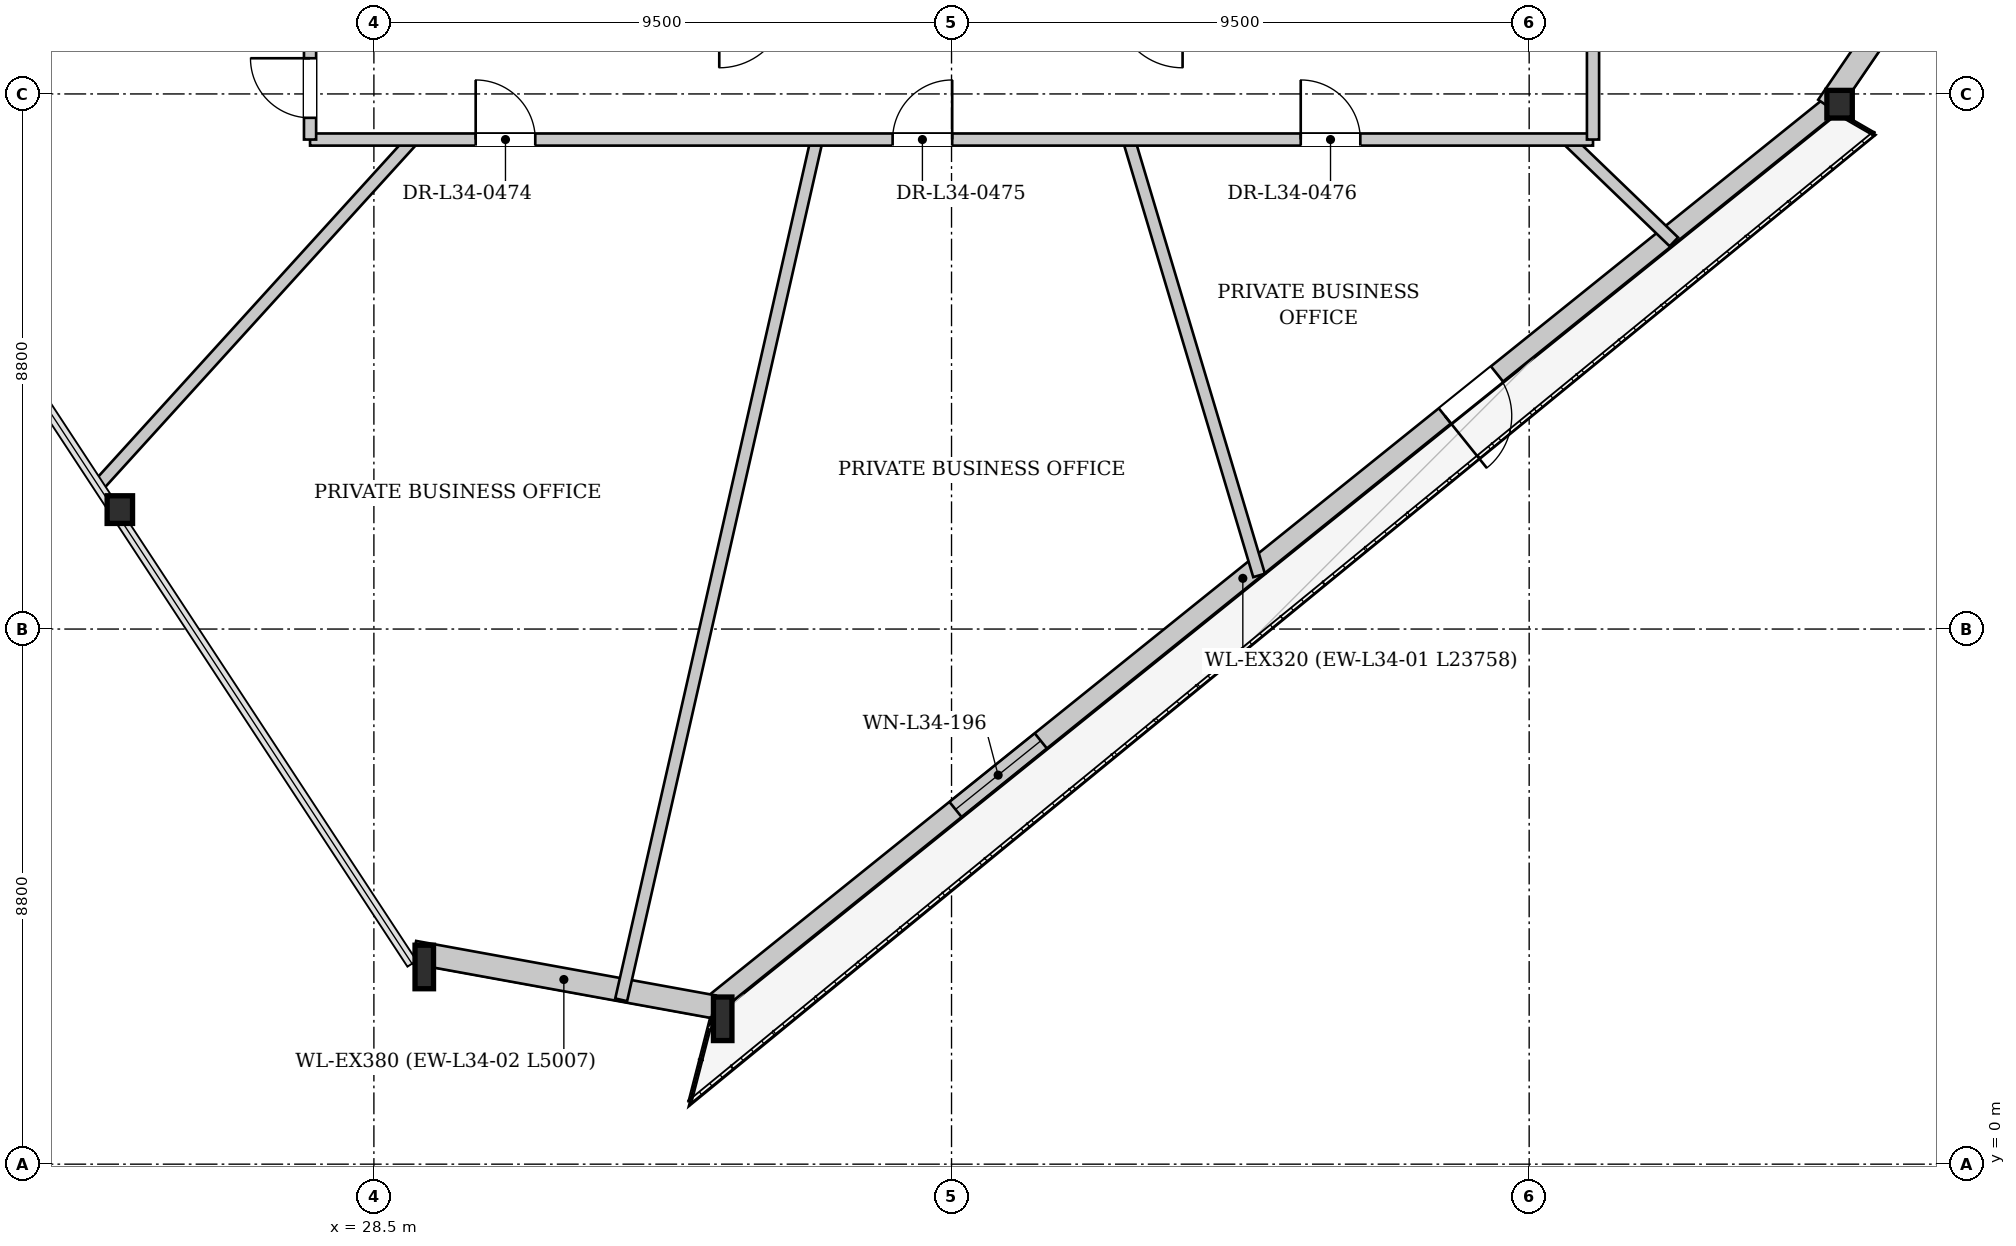
"""IFC4 building model, lengths in metres.
Left out: names, types, materials, properties, quantities, classifications, styles, units other than length and angle.
Written with IfcOpenShell. Run it as: python <this file> out.ifc"""

import sys

from ifc_helpers import new_model, si_unit, direction, frame, frame_2d, origin, origin_2d, place, context, subcontext, project, spatial, rectangle, i_section, extrude, source, transform, mapped, element, fill, save


model = new_model("IFC4")
c1 = context("Model", 3, precision=1e-05, world=origin(), true_north=direction((0.0, 1.0)))
c2 = subcontext(c1, "Body", "Model", "MODEL_VIEW")
j1 = project(units=[si_unit("LENGTHUNIT", "METRE"), si_unit("PLANEANGLEUNIT", "RADIAN")], contexts=[c1])
p1 = place(None, origin())
s1 = spatial("IfcSite", under=j1, at=p1, CompositionType="ELEMENT")
p2 = place(p1, origin())
s2 = spatial("IfcBuilding", under=s1, at=p2, CompositionType="ELEMENT")
p3 = place(p2, frame((0.0, 0.0, 130.55)))
s3 = spatial("IfcBuildingStorey", under=s2, at=p3, CompositionType="ELEMENT", Elevation=130.55)
m1 = source(origin(), c2, "Body", "SweptSolid", [
    extrude(i_section(OverallWidth=0.418, OverallDepth=0.455, WebThickness=0.038, FlangeThickness=0.059, at=origin_2d()), origin(), (0.0, 0.0, 1.0), 3.404),
])
p4 = place(p3, frame((24.167, 10.855, 0.0), z_axis=(0.091084690741, -0.05357501101, 0.994400974109), x_axis=(0.50699046576, 0.861951662002, 0.0)))
e1 = element("IfcColumn", 1, at=p4, inside=s3, PredefinedType="COLUMN", context=c2, shape_type="MappedRepresentation", body=[
    mapped(m1, transform((0.0, 0.0, 0.0), x_axis=(1.0, 0.0, 0.0), y_axis=(0.0, 1.0, 0.0), z_axis=(0.0, 0.0, 1.0), scale=1.0)),
])
m2 = source(origin(), c2, "Body", "SweptSolid", [
    extrude(i_section(OverallWidth=0.304, OverallDepth=0.716, WebThickness=0.021, FlangeThickness=0.04, at=origin_2d()), origin(), (0.0, 0.0, 1.0), 3.411),
])
p5 = place(p3, frame((29.127, 3.297, 0.0), z_axis=(0.118181469683, -0.031853878867, 0.992480967387), x_axis=(0.260246111471, 0.965542314694, 0.0)))
e2 = element("IfcColumn", 2, at=p5, inside=s3, PredefinedType="COLUMN", context=c2, shape_type="MappedRepresentation", body=[
    mapped(m2, transform((0.0, 0.0, 0.0), x_axis=(1.0, 0.0, 0.0), y_axis=(0.0, 1.0, 0.0), z_axis=(0.0, 0.0, 1.0), scale=1.0)),
])
m3 = source(origin(), c2, "Body", "SweptSolid", [
    extrude(i_section(OverallWidth=0.304, OverallDepth=0.716, WebThickness=0.021, FlangeThickness=0.04, at=origin_2d()), origin(), (0.0, 0.0, 1.0), 3.405),
])
p6 = place(p3, frame((34.053, 2.402, 0.0), z_axis=(0.107485148183, -0.006740229439, 0.994183842268), x_axis=(0.062585538851, 0.998039603586, 0.0)))
e3 = element("IfcColumn", 3, at=p6, inside=s3, PredefinedType="COLUMN", context=c2, shape_type="MappedRepresentation", body=[
    mapped(m3, transform((0.0, 0.0, 0.0), x_axis=(1.0, 0.0, 0.0), y_axis=(0.0, 1.0, 0.0), z_axis=(0.0, 0.0, 1.0), scale=1.0)),
])
m4 = source(origin(), c2, "Body", "SweptSolid", [
    extrude(i_section(OverallWidth=0.418, OverallDepth=0.455, WebThickness=0.038, FlangeThickness=0.059, at=origin_2d()), origin(), (0.0, 0.0, 1.0), 3.397),
])
p7 = place(p3, frame((52.567, 17.291, 0.0), z_axis=(0.0222761497, 0.082781046627, 0.996318759973), x_axis=(-0.965648124295, 0.259853227892, 0.0)))
e4 = element("IfcColumn", 4, at=p7, inside=s3, PredefinedType="COLUMN", context=c2, shape_type="MappedRepresentation", body=[
    mapped(m4, transform((0.0, 0.0, 0.0), x_axis=(1.0, 0.0, 0.0), y_axis=(0.0, 1.0, 0.0), z_axis=(0.0, 0.0, 1.0), scale=1.0)),
])
p8 = place(p3, frame((52.467, 17.415, 0.0), z_axis=(0.0, 0.0, 1.0), x_axis=(-0.779274216226, -0.626683090506, 0.0)))
e5 = element("IfcWall", 5, at=p8, inside=s3, PredefinedType="SOLIDWALL", context=c2, shape_type="SweptSolid", body=[
    extrude(rectangle(XDim=23.758, YDim=0.32, at=frame_2d((11.879, 0.0))), origin(), (0.0, 0.0, 1.0), 2.692),
])
p9 = place(p8, frame((7.053, 0.0, 0.0)))
e6 = element("IfcOpeningElement", 6, at=p9, cuts=e5, PredefinedType="OPENING", context=c2, shape_type="SweptSolid", body=[
    extrude(rectangle(XDim=1.1, YDim=2.3, at=frame_2d((0.55, 1.15))), frame((0.0, 0.17, 0.0), z_axis=(0.0, -1.0, 0.0), x_axis=(1.0, 0.0, 0.0)), (0.0, 0.0, 1.0), 0.34),
])
p10 = place(p8, frame((16.681, 0.0, 0.372)))
e7 = element("IfcOpeningElement", 7, at=p10, cuts=e5, PredefinedType="OPENING", context=c2, shape_type="SweptSolid", body=[
    extrude(rectangle(XDim=1.8, YDim=2.2, at=frame_2d((0.9, 1.1))), frame((0.0, 0.17, 0.0), z_axis=(0.0, -1.0, 0.0), x_axis=(1.0, 0.0, 0.0)), (0.0, 0.0, 1.0), 0.34),
])
p11 = place(p3, frame((34.087, 2.589, 0.0), z_axis=(0.0, 0.0, 1.0), x_axis=(-0.983886288639, 0.178795332793, 0.0)))
e8 = element("IfcWall", 8, at=p11, inside=s3, PredefinedType="SOLIDWALL", context=c2, shape_type="SweptSolid", body=[
    extrude(rectangle(XDim=5.007, YDim=0.38, at=frame_2d((2.503, 0.0))), origin(), (0.0, 0.0, 1.0), 2.692),
])
p12 = place(p3, frame((65.801, 37.023, 0.0), z_axis=(0.0, 0.0, 1.0), x_axis=(-0.563622492104, -0.826032497179, 0.0)))
e9 = element("IfcWall", 9, at=p12, inside=s3, PredefinedType="SOLIDWALL", context=c2, shape_type="SweptSolid", body=[
    extrude(rectangle(XDim=23.758, YDim=0.38, at=frame_2d((11.879, 0.0))), origin(), (0.0, 0.0, 1.0), 2.692),
])
p13 = place(p12, frame((5.552, 0.0, 0.322)))
e10 = element("IfcOpeningElement", 10, at=p13, cuts=e9, PredefinedType="OPENING", context=c2, shape_type="SweptSolid", body=[
    extrude(rectangle(XDim=2.2, YDim=2.25, at=frame_2d((1.1, 1.125))), frame((0.0, 0.2, 0.0), z_axis=(0.0, -1.0, 0.0), x_axis=(1.0, 0.0, 0.0)), (0.0, 0.0, 1.0), 0.4),
])
p14 = place(p12, frame((16.756, 0.0, 0.322)))
e11 = element("IfcOpeningElement", 11, at=p14, cuts=e9, PredefinedType="OPENING", context=c2, shape_type="SweptSolid", body=[
    extrude(rectangle(XDim=2.2, YDim=2.25, at=frame_2d((1.1, 1.125))), frame((0.0, 0.2, 0.0), z_axis=(0.0, -1.0, 0.0), x_axis=(1.0, 0.0, 0.0)), (0.0, 0.0, 1.0), 0.4),
])
p15 = place(p3, frame((29.139, 16.85, 0.0), z_axis=(0.0, 0.0, 1.0), x_axis=(-0.672544271628, -0.74005689153, 0.0)))
e12 = element("IfcWall", 12, at=p15, inside=s3, PredefinedType="PARTITIONING", context=c2, shape_type="SweptSolid", body=[
    extrude(rectangle(XDim=7.659, YDim=0.2, at=frame_2d((3.83, 0.0))), origin(), (0.0, 0.0, 1.0), 3.3),
])
p16 = place(p3, frame((35.783, 16.85, 0.0), z_axis=(0.0, 0.0, 1.0), x_axis=(-0.221701107418, -0.975114669652, 0.0)))
e13 = element("IfcWall", 13, at=p16, inside=s3, PredefinedType="PARTITIONING", context=c2, shape_type="SweptSolid", body=[
    extrude(rectangle(XDim=14.509, YDim=0.2, at=frame_2d((7.254, 0.0))), origin(), (0.0, 0.0, 1.0), 3.3),
])
p17 = place(p3, frame((40.915, 16.85, 0.0), z_axis=(0.0, 0.0, 1.0), x_axis=(0.286440656608, -0.958097985721, 0.0)))
e14 = element("IfcWall", 14, at=p17, inside=s3, PredefinedType="PARTITIONING", context=c2, shape_type="SweptSolid", body=[
    extrude(rectangle(XDim=7.482, YDim=0.2, at=frame_2d((3.741, 0.0))), origin(), (0.0, 0.0, 1.0), 3.3),
])
p18 = place(p3, frame((48.132, 16.85, 0.0), z_axis=(0.0, 0.0, 1.0), x_axis=(0.720560376071, -0.69339220102, 0.0)))
e15 = element("IfcWall", 15, at=p18, inside=s3, PredefinedType="PARTITIONING", context=c2, shape_type="SweptSolid", body=[
    extrude(rectangle(XDim=2.426, YDim=0.2, at=frame_2d((1.213, 0.0))), origin(), (0.0, 0.0, 1.0), 3.3),
])
p19 = place(p3, frame((27.45, 16.85, 0.0), z_axis=(0.0, 0.0, 1.0), x_axis=(1.0, 0.0, 0.0)))
e16 = element("IfcWall", 16, at=p19, inside=s3, PredefinedType="PARTITIONING", context=c2, shape_type="SweptSolid", body=[
    extrude(rectangle(XDim=21.1, YDim=0.2, at=frame_2d((10.55, 0.0))), origin(), (0.0, 0.0, 1.0), 3.3),
])
p20 = place(p19, frame((2.724, 0.0, 0.0)))
e17 = element("IfcOpeningElement", 17, at=p20, cuts=e16, PredefinedType="OPENING", context=c2, shape_type="SweptSolid", body=[
    extrude(rectangle(XDim=0.98, YDim=2.15, at=frame_2d((0.49, 1.075))), frame((0.0, 0.11, 0.0), z_axis=(0.0, -1.0, 0.0), x_axis=(1.0, 0.0, 0.0)), (0.0, 0.0, 1.0), 0.22),
])
p21 = place(p19, frame((9.581, 0.0, 0.0)))
e18 = element("IfcOpeningElement", 18, at=p21, cuts=e16, PredefinedType="OPENING", context=c2, shape_type="SweptSolid", body=[
    extrude(rectangle(XDim=0.98, YDim=2.15, at=frame_2d((0.49, 1.075))), frame((0.0, 0.11, 0.0), z_axis=(0.0, -1.0, 0.0), x_axis=(1.0, 0.0, 0.0)), (0.0, 0.0, 1.0), 0.22),
])
p22 = place(p19, frame((16.293, 0.0, 0.0)))
e19 = element("IfcOpeningElement", 19, at=p22, cuts=e16, PredefinedType="OPENING", context=c2, shape_type="SweptSolid", body=[
    extrude(rectangle(XDim=0.98, YDim=2.15, at=frame_2d((0.49, 1.075))), frame((0.0, 0.11, 0.0), z_axis=(0.0, -1.0, 0.0), x_axis=(1.0, 0.0, 0.0)), (0.0, 0.0, 1.0), 0.22),
])
p23 = place(p3, frame((27.45, 16.85, 0.0), z_axis=(0.0, 0.0, 1.0), x_axis=(0.0, 1.0, 0.0)))
e20 = element("IfcWall", 20, at=p23, inside=s3, PredefinedType="PARTITIONING", context=c2, shape_type="SweptSolid", body=[
    extrude(rectangle(XDim=19.5, YDim=0.2, at=frame_2d((9.75, 0.0))), origin(), (0.0, 0.0, 1.0), 3.3),
])
p24 = place(p23, frame((15.887, 0.0, 0.0)))
e21 = element("IfcOpeningElement", 21, at=p24, cuts=e20, PredefinedType="OPENING", context=c2, shape_type="SweptSolid", body=[
    extrude(rectangle(XDim=0.98, YDim=2.15, at=frame_2d((0.49, 1.075))), frame((0.0, 0.11, 0.0), z_axis=(0.0, -1.0, 0.0), x_axis=(1.0, 0.0, 0.0)), (0.0, 0.0, 1.0), 0.22),
])
p25 = place(p23, frame((8.553, 0.0, 0.0)))
e22 = element("IfcOpeningElement", 22, at=p25, cuts=e20, PredefinedType="OPENING", context=c2, shape_type="SweptSolid", body=[
    extrude(rectangle(XDim=0.98, YDim=2.15, at=frame_2d((0.49, 1.075))), frame((0.0, 0.11, 0.0), z_axis=(0.0, -1.0, 0.0), x_axis=(1.0, 0.0, 0.0)), (0.0, 0.0, 1.0), 0.22),
])
p26 = place(p23, frame((0.357, 0.0, 0.0)))
e23 = element("IfcOpeningElement", 23, at=p26, cuts=e20, PredefinedType="OPENING", context=c2, shape_type="SweptSolid", body=[
    extrude(rectangle(XDim=0.98, YDim=2.15, at=frame_2d((0.49, 1.075))), frame((0.0, 0.11, 0.0), z_axis=(0.0, -1.0, 0.0), x_axis=(1.0, 0.0, 0.0)), (0.0, 0.0, 1.0), 0.22),
])
p27 = place(p3, frame((48.55, 16.85, 0.0), z_axis=(0.0, 0.0, 1.0), x_axis=(0.0, 1.0, 0.0)))
e24 = element("IfcWall", 24, at=p27, inside=s3, PredefinedType="PARTITIONING", context=c2, shape_type="SweptSolid", body=[
    extrude(rectangle(XDim=19.5, YDim=0.2, at=frame_2d((9.75, 0.0))), origin(), (0.0, 0.0, 1.0), 3.3),
])
p28 = place(p27, frame((10.625, 0.0, 0.0)))
e25 = element("IfcOpeningElement", 25, at=p28, cuts=e24, PredefinedType="OPENING", context=c2, shape_type="SweptSolid", body=[
    extrude(rectangle(XDim=0.98, YDim=2.15, at=frame_2d((0.49, 1.075))), frame((0.0, 0.11, 0.0), z_axis=(0.0, -1.0, 0.0), x_axis=(1.0, 0.0, 0.0)), (0.0, 0.0, 1.0), 0.22),
])
p29 = place(p27, frame((2.207, 0.0, 0.0)))
e26 = element("IfcOpeningElement", 26, at=p29, cuts=e24, PredefinedType="OPENING", context=c2, shape_type="SweptSolid", body=[
    extrude(rectangle(XDim=0.98, YDim=2.15, at=frame_2d((0.49, 1.075))), frame((0.0, 0.11, 0.0), z_axis=(0.0, -1.0, 0.0), x_axis=(1.0, 0.0, 0.0)), (0.0, 0.0, 1.0), 0.22),
])
m5 = source(origin(), c2, "Body", "SweptSolid", [
    extrude(rectangle(XDim=1.1, YDim=2.3, at=frame_2d((0.55, 1.15))), frame((0.0, 0.025, 0.0), z_axis=(0.0, -1.0, 0.0), x_axis=(1.0, 0.0, 0.0)), (0.0, 0.0, 1.0), 0.05),
])
p30 = place(p9, origin())
e27 = element("IfcDoor", 27, at=p30, inside=s3, OperationType="SINGLE_SWING_RIGHT", PredefinedType="DOOR", context=c2, shape_type="MappedRepresentation", body=[
    mapped(m5, transform((0.0, 0.0, 0.0), x_axis=(1.0, 0.0, 0.0), y_axis=(0.0, 1.0, 0.0), z_axis=(0.0, 0.0, 1.0), scale=1.0)),
])
fill(e6, e27)
m6 = source(origin(), c2, "Body", "SweptSolid", [
    extrude(rectangle(XDim=1.8, YDim=2.2, at=frame_2d((0.9, 1.1))), frame((0.0, 0.03, 0.0), z_axis=(0.0, -1.0, 0.0), x_axis=(1.0, 0.0, 0.0)), (0.0, 0.0, 1.0), 0.06),
])
p31 = place(p10, origin())
e28 = element("IfcWindow", 28, at=p31, inside=s3, PartitioningType="SINGLE_PANEL", PredefinedType="WINDOW", context=c2, shape_type="MappedRepresentation", body=[
    mapped(m6, transform((0.0, 0.0, 0.0), x_axis=(1.0, 0.0, 0.0), y_axis=(0.0, 1.0, 0.0), z_axis=(0.0, 0.0, 1.0), scale=1.0)),
])
fill(e7, e28)
m7 = source(origin(), c2, "Body", "SweptSolid", [
    extrude(rectangle(XDim=0.98, YDim=2.15, at=frame_2d((0.49, 1.075))), frame((0.0, 0.025, 0.0), z_axis=(0.0, -1.0, 0.0), x_axis=(1.0, 0.0, 0.0)), (0.0, 0.0, 1.0), 0.05),
])
p32 = place(p20, origin())
e29 = element("IfcDoor", 29, at=p32, inside=s3, OperationType="SINGLE_SWING_LEFT", PredefinedType="DOOR", context=c2, shape_type="MappedRepresentation", body=[
    mapped(m7, transform((0.0, 0.0, 0.0), x_axis=(1.0, 0.0, 0.0), y_axis=(0.0, 1.0, 0.0), z_axis=(0.0, 0.0, 1.0), scale=1.0)),
])
fill(e17, e29)
p33 = place(p21, origin())
e30 = element("IfcDoor", 30, at=p33, inside=s3, OperationType="SINGLE_SWING_RIGHT", PredefinedType="DOOR", context=c2, shape_type="MappedRepresentation", body=[
    mapped(m7, transform((0.0, 0.0, 0.0), x_axis=(1.0, 0.0, 0.0), y_axis=(0.0, 1.0, 0.0), z_axis=(0.0, 0.0, 1.0), scale=1.0)),
])
fill(e18, e30)
p34 = place(p22, origin())
e31 = element("IfcDoor", 31, at=p34, inside=s3, OperationType="SINGLE_SWING_LEFT", PredefinedType="DOOR", context=c2, shape_type="MappedRepresentation", body=[
    mapped(m7, transform((0.0, 0.0, 0.0), x_axis=(1.0, 0.0, 0.0), y_axis=(0.0, 1.0, 0.0), z_axis=(0.0, 0.0, 1.0), scale=1.0)),
])
fill(e19, e31)
p35 = place(p26, origin())
e32 = element("IfcDoor", 32, at=p35, inside=s3, OperationType="SINGLE_SWING_RIGHT", PredefinedType="DOOR", context=c2, shape_type="MappedRepresentation", body=[
    mapped(m7, transform((0.0, 0.0, 0.0), x_axis=(1.0, 0.0, 0.0), y_axis=(0.0, 1.0, 0.0), z_axis=(0.0, 0.0, 1.0), scale=1.0)),
])
fill(e23, e32)
save(model, sys.argv[1])
